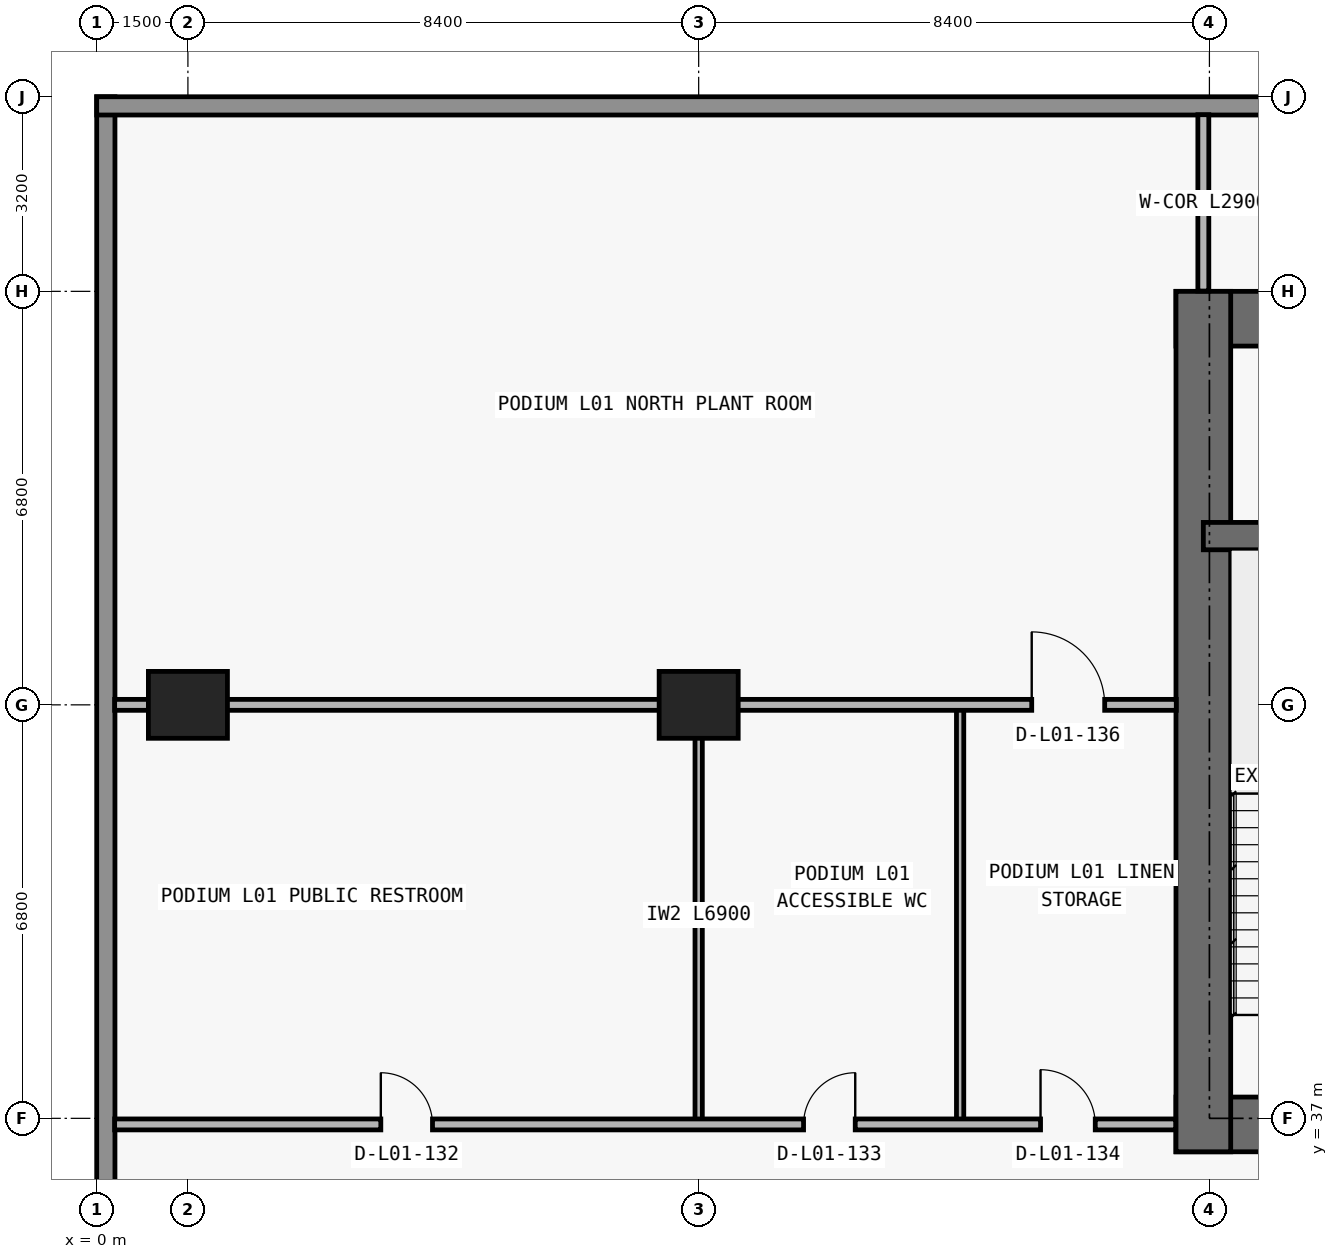
"""IFC4 building model, lengths in metres.
Left out: names, types, materials, properties, quantities, classifications, styles, units other than length and angle.
Written with IfcOpenShell. Run it as: python <this file> out.ifc"""

import sys

from ifc_helpers import new_model, si_unit, direction, frame, frame_2d, origin, origin_2d, place, context, subcontext, project, spatial, rectangle, extrude, element, fill, save


model = new_model("IFC4")
c1 = context("Model", 3, precision=1e-05, world=origin(), true_north=direction((0.0, 1.0)))
c2 = subcontext(c1, "Body", "Model", "MODEL_VIEW")
j1 = project(units=[si_unit("LENGTHUNIT", "METRE"), si_unit("PLANEANGLEUNIT", "RADIAN")], contexts=[c1])
p1 = place(None, origin())
s1 = spatial("IfcSite", under=j1, at=p1, CompositionType="ELEMENT")
p2 = place(p1, origin())
s2 = spatial("IfcBuilding", under=s1, at=p2, CompositionType="ELEMENT")
p3 = place(p2, frame((0.0, 0.0, 5.4)))
s3 = spatial("IfcBuildingStorey", under=s2, at=p3, CompositionType="ELEMENT", Elevation=5.4)
for number, where, z_axis, x_axis in (
    (1, (1.5, 43.8, 0.0), (0.0, 0.0, 1.0), (1.0, 0.0, 0.0)),
    (2, (9.9, 43.8, 0.0), (0.0, 0.0, 1.0), (1.0, 0.0, 0.0)),
):
    element("IfcColumn", number, at=place(p3, frame(where, z_axis=z_axis, x_axis=x_axis)), inside=s3, PredefinedType="COLUMN", context=c2, shape_type="SweptSolid", body=[
        extrude(rectangle(XDim=1.3, YDim=1.1, at=origin_2d()), origin(), (0.0, 0.0, 1.0), 4.5),
    ])
p4 = place(p3, frame((17.75, 36.9, 0.0), z_axis=(0.0, 0.0, 1.0), x_axis=(1.0, 0.0, 0.0)))
e3 = element("IfcWall", 3, at=p4, inside=s3, PredefinedType="SHEAR", context=c2, shape_type="SweptSolid", body=[
    extrude(rectangle(XDim=42.3, YDim=0.9, at=frame_2d((21.15, 0.0))), origin(), (0.0, 0.0, 1.0), 4.5),
])
p5 = place(p4, frame((14.55, 0.0, 0.0)))
e4 = element("IfcOpeningElement", 4, at=p5, cuts=e3, PredefinedType="OPENING", context=c2, shape_type="SweptSolid", body=[
    extrude(rectangle(XDim=1.1, YDim=2.15, at=frame_2d((0.55, 1.075))), frame((0.0, 0.46, 0.0), z_axis=(0.0, -1.0, 0.0), x_axis=(1.0, 0.0, 0.0)), (0.0, 0.0, 1.0), 0.92),
])
p6 = place(p4, frame((6.4, 0.0, 0.0)))
e5 = element("IfcOpeningElement", 5, at=p6, cuts=e3, PredefinedType="OPENING", context=c2, shape_type="SweptSolid", body=[
    extrude(rectangle(XDim=1.05, YDim=2.15, at=frame_2d((0.525, 1.075))), frame((0.0, 0.46, 0.0), z_axis=(0.0, -1.0, 0.0), x_axis=(1.0, 0.0, 0.0)), (0.0, 0.0, 1.0), 0.92),
])
p7 = place(p4, frame((34.9, 0.0, 0.0)))
e6 = element("IfcOpeningElement", 6, at=p7, cuts=e3, PredefinedType="OPENING", context=c2, shape_type="SweptSolid", body=[
    extrude(rectangle(XDim=1.05, YDim=2.15, at=frame_2d((0.525, 1.075))), frame((0.0, 0.46, 0.0), z_axis=(0.0, -1.0, 0.0), x_axis=(1.0, 0.0, 0.0)), (0.0, 0.0, 1.0), 0.92),
])
p8 = place(p4, frame((11.012, 0.0, 0.0)))
e7 = element("IfcOpeningElement", 7, at=p8, cuts=e3, PredefinedType="OPENING", context=c2, shape_type="SweptSolid", body=[
    extrude(rectangle(XDim=1.05, YDim=2.15, at=frame_2d((0.525, 1.075))), frame((0.0, 0.46, 0.0), z_axis=(0.0, -1.0, 0.0), x_axis=(1.0, 0.0, 0.0)), (0.0, 0.0, 1.0), 0.92),
])
p9 = place(p4, frame((24.25, 0.0, 0.0)))
e8 = element("IfcOpeningElement", 8, at=p9, cuts=e3, PredefinedType="OPENING", context=c2, shape_type="SweptSolid", body=[
    extrude(rectangle(XDim=1.05, YDim=2.15, at=frame_2d((0.525, 1.075))), frame((0.0, 0.46, 0.0), z_axis=(0.0, -1.0, 0.0), x_axis=(1.0, 0.0, 0.0)), (0.0, 0.0, 1.0), 0.92),
])
p10 = place(p3, frame((17.75, 50.15, 0.0), z_axis=(0.0, 0.0, 1.0), x_axis=(1.0, 0.0, 0.0)))
e9 = element("IfcWall", 9, at=p10, inside=s3, PredefinedType="SHEAR", context=c2, shape_type="SweptSolid", body=[
    extrude(rectangle(XDim=42.3, YDim=0.9, at=frame_2d((21.15, 0.0))), origin(), (0.0, 0.0, 1.0), 4.5),
])
p11 = place(p3, frame((18.2, 36.45, 0.0), z_axis=(0.0, 0.0, 1.0), x_axis=(0.0, 1.0, 0.0)))
e10 = element("IfcWall", 10, at=p11, inside=s3, PredefinedType="SHEAR", context=c2, shape_type="SweptSolid", body=[
    extrude(rectangle(XDim=14.15, YDim=0.9, at=frame_2d((7.075, 0.0))), origin(), (0.0, 0.0, 1.0), 4.5),
])
p12 = place(p3, frame((18.2, 46.575, 0.0), z_axis=(0.0, 0.0, 1.0), x_axis=(1.0, 0.0, 0.0)))
e11 = element("IfcWall", 11, at=p12, inside=s3, PredefinedType="SHEAR", context=c2, shape_type="SweptSolid", body=[
    extrude(rectangle(XDim=41.4, YDim=0.45, at=frame_2d((20.7, 0.0))), origin(), (0.0, 0.0, 1.0), 4.5),
])
p13 = place(p12, frame((7.675, 0.0, 0.0)))
e12 = element("IfcOpeningElement", 12, at=p13, cuts=e11, PredefinedType="OPENING", context=c2, shape_type="SweptSolid", body=[
    extrude(rectangle(XDim=1.05, YDim=2.15, at=frame_2d((0.525, 1.075))), frame((0.0, 0.235, 0.0), z_axis=(0.0, -1.0, 0.0), x_axis=(1.0, 0.0, 0.0)), (0.0, 0.0, 1.0), 0.47),
])
p14 = place(p12, frame((32.725, 0.0, 0.0)))
e13 = element("IfcOpeningElement", 13, at=p14, cuts=e11, PredefinedType="OPENING", context=c2, shape_type="SweptSolid", body=[
    extrude(rectangle(XDim=1.05, YDim=2.15, at=frame_2d((0.525, 1.075))), frame((0.0, 0.235, 0.0), z_axis=(0.0, -1.0, 0.0), x_axis=(1.0, 0.0, 0.0)), (0.0, 0.0, 1.0), 0.47),
])
p15 = place(p3, frame((0.15, 26.9, 0.0), z_axis=(0.0, 0.0, 1.0), x_axis=(0.0, 1.0, 0.0)))
e14 = element("IfcWall", 14, at=p15, inside=s3, PredefinedType="STANDARD", context=c2, shape_type="SweptSolid", body=[
    extrude(rectangle(XDim=26.9, YDim=0.3, at=frame_2d((13.45, 0.0))), origin(), (0.0, 0.0, 1.0), 4.5),
])
p16 = place(p3, frame((0.0, 53.65, 0.0), z_axis=(0.0, 0.0, 1.0), x_axis=(1.0, 0.0, 0.0)))
e15 = element("IfcWall", 15, at=p16, inside=s3, PredefinedType="STANDARD", context=c2, shape_type="SweptSolid", body=[
    extrude(rectangle(XDim=77.8, YDim=0.3, at=frame_2d((38.9, 0.0))), origin(), (0.0, 0.0, 1.0), 4.5),
])
p17 = place(p3, frame((9.9, 36.9, 0.0), z_axis=(0.0, 0.0, 1.0), x_axis=(0.0, 1.0, 0.0)))
e16 = element("IfcWall", 16, at=p17, inside=s3, PredefinedType="PARTITIONING", context=c2, shape_type="SweptSolid", body=[
    extrude(rectangle(XDim=6.9, YDim=0.12, at=frame_2d((3.45, 0.0))), origin(), (0.0, 0.0, 1.0), 3.464),
])
p18 = place(p3, frame((14.2, 36.9, 0.0), z_axis=(0.0, 0.0, 1.0), x_axis=(0.0, 1.0, 0.0)))
e17 = element("IfcWall", 17, at=p18, inside=s3, PredefinedType="PARTITIONING", context=c2, shape_type="SweptSolid", body=[
    extrude(rectangle(XDim=6.9, YDim=0.12, at=frame_2d((3.45, 0.0))), origin(), (0.0, 0.0, 1.0), 4.5),
])
p19 = place(p3, frame((18.2, 50.605, 0.0), z_axis=(0.0, 0.0, 1.0), x_axis=(0.0, 1.0, 0.0)))
e18 = element("IfcWall", 18, at=p19, inside=s3, PredefinedType="PARTITIONING", context=c2, shape_type="SweptSolid", body=[
    extrude(rectangle(XDim=2.9, YDim=0.18, at=frame_2d((1.45, 0.0))), origin(), (0.0, 0.0, 1.0), 4.5),
])
p20 = place(p3, frame((0.295, 36.9, 0.0), z_axis=(0.0, 0.0, 1.0), x_axis=(1.0, 0.0, 0.0)))
e19 = element("IfcWall", 19, at=p20, inside=s3, PredefinedType="PARTITIONING", context=c2, shape_type="SweptSolid", body=[
    extrude(rectangle(XDim=17.45, YDim=0.18, at=frame_2d((8.725, 0.0))), origin(), (0.0, 0.0, 1.0), 4.5),
])
p21 = place(p20, frame((4.377, 0.0, 0.0)))
e20 = element("IfcOpeningElement", 20, at=p21, cuts=e19, PredefinedType="OPENING", context=c2, shape_type="SweptSolid", body=[
    extrude(rectangle(XDim=0.85, YDim=2.1, at=frame_2d((0.425, 1.05))), frame((0.0, 0.1, 0.0), z_axis=(0.0, -1.0, 0.0), x_axis=(1.0, 0.0, 0.0)), (0.0, 0.0, 1.0), 0.2),
])
p22 = place(p20, frame((11.33, 0.0, 0.0)))
e21 = element("IfcOpeningElement", 21, at=p22, cuts=e19, PredefinedType="OPENING", context=c2, shape_type="SweptSolid", body=[
    extrude(rectangle(XDim=0.85, YDim=2.1, at=frame_2d((0.425, 1.05))), frame((0.0, 0.1, 0.0), z_axis=(0.0, -1.0, 0.0), x_axis=(1.0, 0.0, 0.0)), (0.0, 0.0, 1.0), 0.2),
])
p23 = place(p20, frame((15.228, 0.0, 0.0)))
e22 = element("IfcOpeningElement", 22, at=p23, cuts=e19, PredefinedType="OPENING", context=c2, shape_type="SweptSolid", body=[
    extrude(rectangle(XDim=0.9, YDim=2.15, at=frame_2d((0.45, 1.075))), frame((0.0, 0.1, 0.0), z_axis=(0.0, -1.0, 0.0), x_axis=(1.0, 0.0, 0.0)), (0.0, 0.0, 1.0), 0.2),
])
p24 = place(p3, frame((0.295, 43.8, 0.0), z_axis=(0.0, 0.0, 1.0), x_axis=(1.0, 0.0, 0.0)))
e23 = element("IfcWall", 23, at=p24, inside=s3, PredefinedType="PARTITIONING", context=c2, shape_type="SweptSolid", body=[
    extrude(rectangle(XDim=17.46, YDim=0.18, at=frame_2d((8.73, 0.0))), origin(), (0.0, 0.0, 1.0), 3.789),
])
p25 = place(p24, frame((15.083, 0.0, 0.0)))
e24 = element("IfcOpeningElement", 24, at=p25, cuts=e23, PredefinedType="OPENING", context=c2, shape_type="SweptSolid", body=[
    extrude(rectangle(XDim=1.2, YDim=2.2, at=frame_2d((0.6, 1.1))), frame((0.0, 0.1, 0.0), z_axis=(0.0, -1.0, 0.0), x_axis=(1.0, 0.0, 0.0)), (0.0, 0.0, 1.0), 0.2),
])
p26 = place(p21, origin())
e25 = element("IfcDoor", 25, at=p26, inside=s3, OperationType="SINGLE_SWING_LEFT", PredefinedType="DOOR", context=c2, shape_type="SweptSolid", body=[
    extrude(rectangle(XDim=0.85, YDim=2.1, at=frame_2d((0.425, 1.05))), frame((0.0, 0.025, 0.0), z_axis=(0.0, -1.0, 0.0), x_axis=(1.0, 0.0, 0.0)), (0.0, 0.0, 1.0), 0.05),
])
fill(e20, e25)
p27 = place(p22, origin())
e26 = element("IfcDoor", 26, at=p27, inside=s3, OperationType="SINGLE_SWING_RIGHT", PredefinedType="DOOR", context=c2, shape_type="SweptSolid", body=[
    extrude(rectangle(XDim=0.85, YDim=2.1, at=frame_2d((0.425, 1.05))), frame((0.0, 0.025, 0.0), z_axis=(0.0, -1.0, 0.0), x_axis=(1.0, 0.0, 0.0)), (0.0, 0.0, 1.0), 0.05),
])
fill(e21, e26)
p28 = place(p23, origin())
e27 = element("IfcDoor", 27, at=p28, inside=s3, OperationType="SINGLE_SWING_LEFT", PredefinedType="DOOR", context=c2, shape_type="SweptSolid", body=[
    extrude(rectangle(XDim=0.9, YDim=2.15, at=frame_2d((0.45, 1.075))), frame((0.0, 0.025, 0.0), z_axis=(0.0, -1.0, 0.0), x_axis=(1.0, 0.0, 0.0)), (0.0, 0.0, 1.0), 0.05),
])
fill(e22, e27)
p29 = place(p25, origin())
e28 = element("IfcDoor", 28, at=p29, inside=s3, OperationType="SINGLE_SWING_LEFT", PredefinedType="DOOR", context=c2, shape_type="SweptSolid", body=[
    extrude(rectangle(XDim=1.2, YDim=2.2, at=frame_2d((0.6, 1.1))), frame((0.0, 0.025, 0.0), z_axis=(0.0, -1.0, 0.0), x_axis=(1.0, 0.0, 0.0)), (0.0, 0.0, 1.0), 0.05),
])
fill(e24, e28)
save(model, sys.argv[1])
